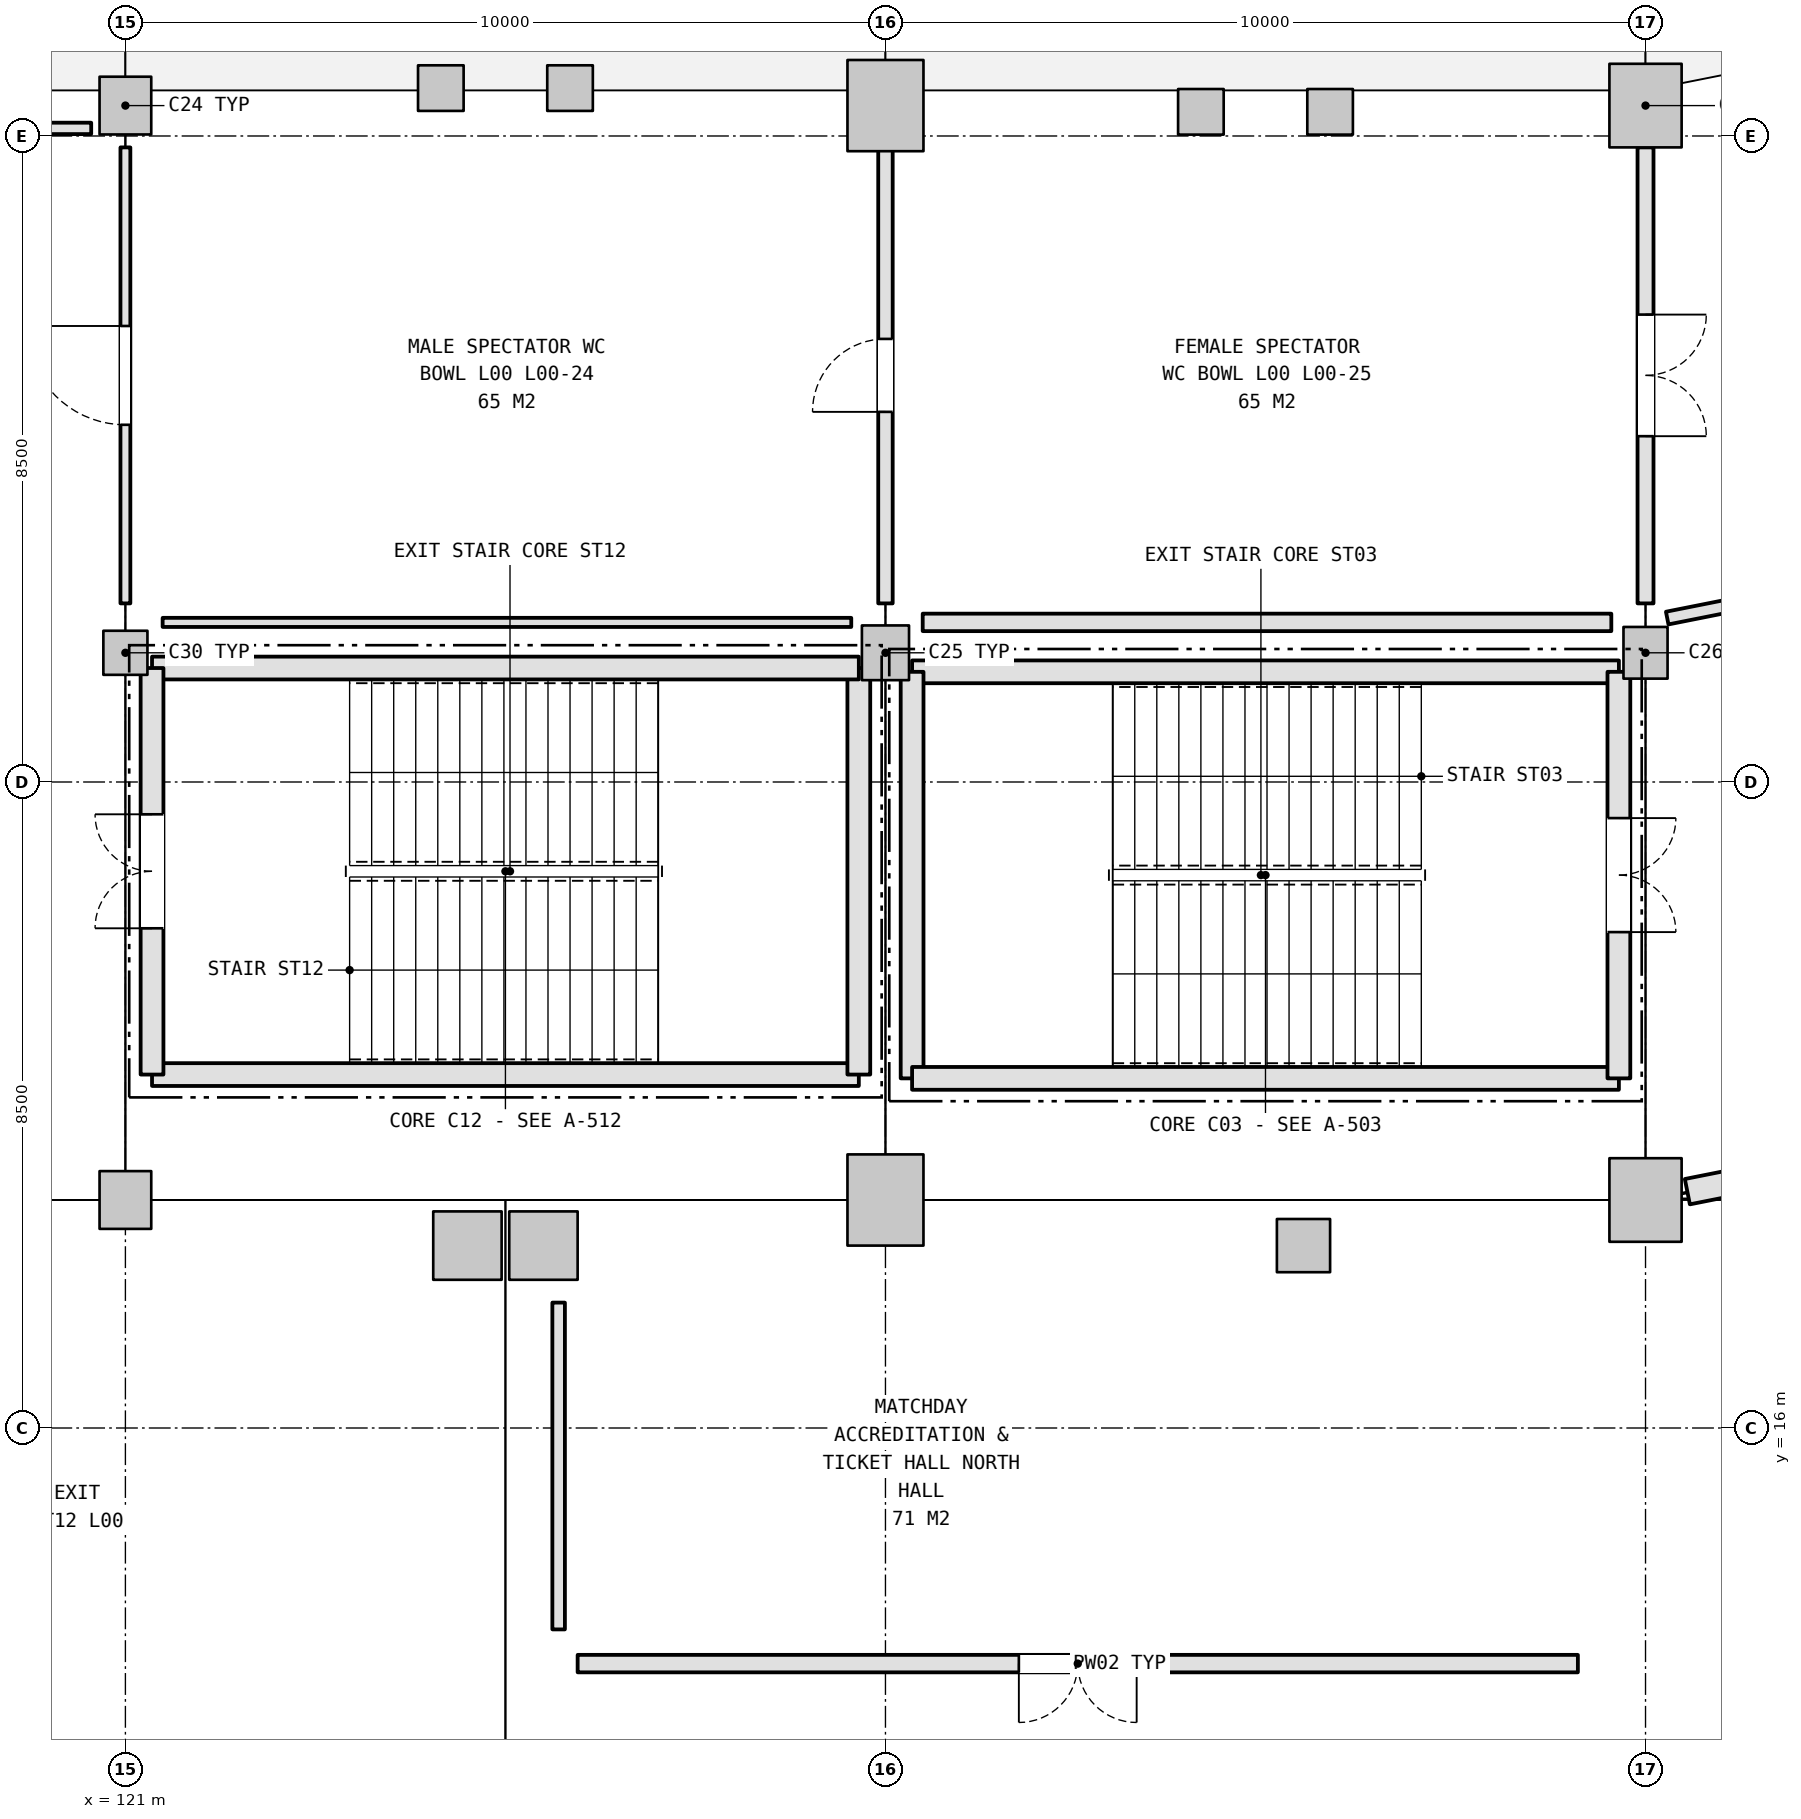
"""IFC4 building model, lengths in metres.
Left out: names, types, materials, properties, quantities, classifications, styles, units other than length and angle.
Written with IfcOpenShell. Run it as: python <this file> out.ifc"""

import sys

from ifc_helpers import new_model, si_unit, direction, frame, frame_2d, origin, origin_2d, place, context, subcontext, project, spatial, rectangle, extrude, element, fill, save


model = new_model("IFC4")
c1 = context("Model", 3, precision=1e-05, world=origin(), true_north=direction((0.0, 1.0)))
c2 = subcontext(c1, "Body", "Model", "MODEL_VIEW")
j1 = project(units=[si_unit("LENGTHUNIT", "METRE"), si_unit("PLANEANGLEUNIT", "RADIAN")], contexts=[c1])
p1 = place(None, origin())
s1 = spatial("IfcSite", under=j1, at=p1, CompositionType="ELEMENT")
p2 = place(p1, origin())
s2 = spatial("IfcBuilding", under=s1, at=p2, CompositionType="ELEMENT")
p3 = place(p2, origin())
s3 = spatial("IfcBuildingStorey", under=s2, at=p3, CompositionType="ELEMENT", Elevation=0.0)
p4 = place(p3, frame((121.0, 33.4, 0.0), z_axis=(0.0, 0.0, 1.0), x_axis=(1.0, 0.0, 0.0)))
e1 = element("IfcColumn", 1, at=p4, inside=s3, PredefinedType="COLUMN", context=c2, shape_type="SweptSolid", body=[
    extrude(rectangle(XDim=0.68, YDim=0.76, at=origin_2d()), origin(), (0.0, 0.0, 1.0), 5.4),
])
p5 = place(p3, frame((121.0, 26.2, 0.0), z_axis=(0.0, 0.0, 1.0), x_axis=(1.0, 0.0, 0.0)))
e2 = element("IfcColumn", 2, at=p5, inside=s3, PredefinedType="COLUMN", context=c2, shape_type="SweptSolid", body=[
    extrude(rectangle(XDim=0.58, YDim=0.58, at=origin_2d()), origin(), (0.0, 0.0, 1.0), 5.4),
])
p6 = place(p3, frame((121.0, 19.0, 0.0), z_axis=(0.0, 0.0, 1.0), x_axis=(1.0, 0.0, 0.0)))
e3 = element("IfcColumn", 3, at=p6, inside=s3, PredefinedType="COLUMN", context=c2, shape_type="SweptSolid", body=[
    extrude(rectangle(XDim=0.68, YDim=0.76, at=origin_2d()), origin(), (0.0, 0.0, 1.0), 5.4),
])
p7 = place(p3, frame((131.0, 33.4, 0.0), z_axis=(0.0, 0.0, 1.0), x_axis=(1.0, 0.0, 0.0)))
e4 = element("IfcColumn", 4, at=p7, inside=s3, PredefinedType="COLUMN", context=c2, shape_type="SweptSolid", body=[
    extrude(rectangle(XDim=1.0, YDim=1.2, at=origin_2d()), origin(), (0.0, 0.0, 1.0), 5.4),
])
p8 = place(p3, frame((131.0, 26.2, 0.0), z_axis=(0.0, 0.0, 1.0), x_axis=(1.0, 0.0, 0.0)))
e5 = element("IfcColumn", 5, at=p8, inside=s3, PredefinedType="COLUMN", context=c2, shape_type="SweptSolid", body=[
    extrude(rectangle(XDim=0.62, YDim=0.72, at=origin_2d()), origin(), (0.0, 0.0, 1.0), 5.4),
])
p9 = place(p3, frame((131.0, 19.0, 0.0), z_axis=(0.0, 0.0, 1.0), x_axis=(1.0, 0.0, 0.0)))
e6 = element("IfcColumn", 6, at=p9, inside=s3, PredefinedType="COLUMN", context=c2, shape_type="SweptSolid", body=[
    extrude(rectangle(XDim=1.0, YDim=1.2, at=origin_2d()), origin(), (0.0, 0.0, 1.0), 5.4),
])
p10 = place(p3, frame((141.0, 33.4, 0.0), z_axis=(0.0, 0.0, 1.0), x_axis=(1.0, 0.0, 0.0)))
e7 = element("IfcColumn", 7, at=p10, inside=s3, PredefinedType="COLUMN", context=c2, shape_type="SweptSolid", body=[
    extrude(rectangle(XDim=0.95, YDim=1.1, at=origin_2d()), origin(), (0.0, 0.0, 1.0), 5.4),
])
p11 = place(p3, frame((141.0, 26.2, 0.0), z_axis=(0.0, 0.0, 1.0), x_axis=(1.0, 0.0, 0.0)))
e8 = element("IfcColumn", 8, at=p11, inside=s3, PredefinedType="COLUMN", context=c2, shape_type="SweptSolid", body=[
    extrude(rectangle(XDim=0.58, YDim=0.68, at=origin_2d()), origin(), (0.0, 0.0, 1.0), 5.4),
])
p12 = place(p3, frame((141.0, 19.0, 0.0), z_axis=(0.0, 0.0, 1.0), x_axis=(1.0, 0.0, 0.0)))
e9 = element("IfcColumn", 9, at=p12, inside=s3, PredefinedType="COLUMN", context=c2, shape_type="SweptSolid", body=[
    extrude(rectangle(XDim=0.95, YDim=1.1, at=origin_2d()), origin(), (0.0, 0.0, 1.0), 5.4),
])
p13 = place(p3, frame((126.5, 18.4, 0.0), z_axis=(0.0, 0.0, 1.0), x_axis=(1.0, 0.0, 0.0)))
e10 = element("IfcColumn", 10, at=p13, inside=s3, PredefinedType="COLUMN", context=c2, shape_type="SweptSolid", body=[
    extrude(rectangle(XDim=0.9, YDim=0.9, at=origin_2d()), origin(), (0.0, 0.0, 1.0), 5.4),
])
p14 = place(p3, frame((136.5, 18.4, 0.0), z_axis=(0.0, 0.0, 1.0), x_axis=(1.0, 0.0, 0.0)))
e11 = element("IfcColumn", 11, at=p14, inside=s3, PredefinedType="COLUMN", context=c2, shape_type="SweptSolid", body=[
    extrude(rectangle(XDim=0.7, YDim=0.7, at=origin_2d()), origin(), (0.0, 0.0, 1.0), 5.4),
])
p15 = place(p3, frame((125.5, 18.4, 0.0), z_axis=(0.0, 0.0, 1.0), x_axis=(1.0, 0.0, 0.0)))
e12 = element("IfcColumn", 12, at=p15, inside=s3, PredefinedType="COLUMN", context=c2, shape_type="SweptSolid", body=[
    extrude(rectangle(XDim=0.9, YDim=0.9, at=origin_2d()), origin(), (0.0, 0.0, 1.0), 5.4),
])
p16 = place(p3, frame((141.55, 19.11, 0.0), z_axis=(0.0, 0.0, 1.0), x_axis=(0.980787488403, 0.195079221324, 0.0)))
e13 = element("IfcWall", 13, at=p16, inside=s3, PredefinedType="SOLIDWALL", context=c2, shape_type="SweptSolid", body=[
    extrude(rectangle(XDim=19.246, YDim=0.34, at=frame_2d((9.623, 0.0))), origin(), (0.0, 0.0, 1.0), 4.275),
])
p17 = place(p16, frame((8.823, 0.0, 2.4)))
e14 = element("IfcOpeningElement", 14, at=p17, cuts=e13, PredefinedType="OPENING", context=c2, shape_type="SweptSolid", body=[
    extrude(rectangle(XDim=1.6, YDim=1.2, at=frame_2d((0.8, 0.6))), frame((0.0, 0.18, 0.0), z_axis=(0.0, -1.0, 0.0), x_axis=(1.0, 0.0, 0.0)), (0.0, 0.0, 1.0), 0.36),
])
p18 = place(p3, frame((140.65, 25.95, 0.0), z_axis=(0.0, 0.0, 1.0), x_axis=(-1.0, 0.0, 0.0)))
e15 = element("IfcWall", 15, at=p18, inside=s3, PredefinedType="SHEAR", context=c2, shape_type="SweptSolid", body=[
    extrude(rectangle(XDim=9.299, YDim=0.3, at=frame_2d((4.65, 0.0))), origin(), (0.0, 0.0, 1.0), 5.14),
])
p19 = place(p3, frame((131.35, 25.95, 0.0), z_axis=(0.0, 0.0, 1.0), x_axis=(0.0, -1.0, 0.0)))
e16 = element("IfcWall", 16, at=p19, inside=s3, PredefinedType="SHEAR", context=c2, shape_type="SweptSolid", body=[
    extrude(rectangle(XDim=5.349, YDim=0.3, at=frame_2d((2.675, 0.0))), origin(), (0.0, 0.0, 1.0), 5.14),
])
p20 = place(p3, frame((131.35, 20.6, 0.0), z_axis=(0.0, 0.0, 1.0), x_axis=(1.0, 0.0, 0.0)))
e17 = element("IfcWall", 17, at=p20, inside=s3, PredefinedType="SHEAR", context=c2, shape_type="SweptSolid", body=[
    extrude(rectangle(XDim=9.299, YDim=0.3, at=frame_2d((4.65, 0.0))), origin(), (0.0, 0.0, 1.0), 5.14),
])
p21 = place(p3, frame((140.65, 20.6, 0.0), z_axis=(0.0, 0.0, 1.0), x_axis=(0.0, 1.0, 0.0)))
e18 = element("IfcWall", 18, at=p21, inside=s3, PredefinedType="SHEAR", context=c2, shape_type="SweptSolid", body=[
    extrude(rectangle(XDim=5.349, YDim=0.3, at=frame_2d((2.675, 0.0))), origin(), (0.0, 0.0, 1.0), 5.14),
])
p22 = place(p21, frame((1.925, 0.0, 0.0)))
e19 = element("IfcOpeningElement", 19, at=p22, cuts=e18, PredefinedType="OPENING", context=c2, shape_type="SweptSolid", body=[
    extrude(rectangle(XDim=1.5, YDim=2.2, at=frame_2d((0.75, 1.1))), frame((0.0, 0.16, 0.0), z_axis=(0.0, -1.0, 0.0), x_axis=(1.0, 0.0, 0.0)), (0.0, 0.0, 1.0), 0.32),
])
p23 = place(p3, frame((121.35, 20.65, 0.0), z_axis=(0.0, 0.0, 1.0), x_axis=(1.0, 0.0, 0.0)))
e20 = element("IfcWall", 20, at=p23, inside=s3, PredefinedType="SHEAR", context=c2, shape_type="SweptSolid", body=[
    extrude(rectangle(XDim=9.299, YDim=0.3, at=frame_2d((4.65, 0.0))), origin(), (0.0, 0.0, 1.0), 5.14),
])
p24 = place(p3, frame((130.65, 20.65, 0.0), z_axis=(0.0, 0.0, 1.0), x_axis=(0.0, 1.0, 0.0)))
e21 = element("IfcWall", 21, at=p24, inside=s3, PredefinedType="SHEAR", context=c2, shape_type="SweptSolid", body=[
    extrude(rectangle(XDim=5.349, YDim=0.3, at=frame_2d((2.675, 0.0))), origin(), (0.0, 0.0, 1.0), 5.14),
])
p25 = place(p3, frame((130.65, 26.0, 0.0), z_axis=(0.0, 0.0, 1.0), x_axis=(-1.0, 0.0, 0.0)))
e22 = element("IfcWall", 22, at=p25, inside=s3, PredefinedType="SHEAR", context=c2, shape_type="SweptSolid", body=[
    extrude(rectangle(XDim=9.299, YDim=0.3, at=frame_2d((4.65, 0.0))), origin(), (0.0, 0.0, 1.0), 5.14),
])
p26 = place(p3, frame((121.35, 26.0, 0.0), z_axis=(0.0, 0.0, 1.0), x_axis=(0.0, -1.0, 0.0)))
e23 = element("IfcWall", 23, at=p26, inside=s3, PredefinedType="SHEAR", context=c2, shape_type="SweptSolid", body=[
    extrude(rectangle(XDim=5.349, YDim=0.3, at=frame_2d((2.675, 0.0))), origin(), (0.0, 0.0, 1.0), 5.14),
])
p27 = place(p26, frame((1.925, 0.0, 0.0)))
e24 = element("IfcOpeningElement", 24, at=p27, cuts=e23, PredefinedType="OPENING", context=c2, shape_type="SweptSolid", body=[
    extrude(rectangle(XDim=1.5, YDim=2.2, at=frame_2d((0.75, 1.1))), frame((0.0, 0.16, 0.0), z_axis=(0.0, -1.0, 0.0), x_axis=(1.0, 0.0, 0.0)), (0.0, 0.0, 1.0), 0.32),
])
for number, where, z_axis, x_axis in (
    (25, (126.85, 33.63, 0.0), (0.0, 0.0, 1.0), (1.0, 0.0, 0.0)),
    (26, (125.15, 33.63, 0.0), (0.0, 0.0, 1.0), (1.0, 0.0, 0.0)),
    (27, (136.85, 33.318, 0.0), (0.0, 0.0, 1.0), (1.0, 0.0, 0.0)),
    (28, (135.15, 33.318, 0.0), (0.0, 0.0, 1.0), (1.0, 0.0, 0.0)),
):
    element("IfcColumn", number, at=place(p3, frame(where, z_axis=z_axis, x_axis=x_axis)), inside=s3, PredefinedType="COLUMN", context=c2, shape_type="SweptSolid", body=[
        extrude(rectangle(XDim=0.6, YDim=0.6, at=origin_2d()), origin(), (0.0, 0.0, 1.0), 5.4),
    ])
p28 = place(p3, frame((140.11, 12.9, 0.0), z_axis=(0.0, 0.0, 1.0), x_axis=(-1.0, 0.0, 0.0)))
e29 = element("IfcWall", 29, at=p28, inside=s3, PredefinedType="PLUMBINGWALL", context=c2, shape_type="SweptSolid", body=[
    extrude(rectangle(XDim=13.16, YDim=0.23, at=frame_2d((6.58, 0.0))), origin(), (0.0, 0.0, 1.0), 4.425),
])
p29 = place(p28, frame((5.805, 0.0, 0.0)))
e30 = element("IfcOpeningElement", 30, at=p29, cuts=e29, PredefinedType="OPENING", context=c2, shape_type="SweptSolid", body=[
    extrude(rectangle(XDim=1.55, YDim=2.15, at=frame_2d((0.775, 1.075))), frame((0.0, 0.125, 0.0), z_axis=(0.0, -1.0, 0.0), x_axis=(1.0, 0.0, 0.0)), (0.0, 0.0, 1.0), 0.25),
])
p30 = place(p3, frame((126.7, 13.35, 0.0), z_axis=(0.0, 0.0, 1.0), x_axis=(0.0, 1.0, 0.0)))
e31 = element("IfcWall", 31, at=p30, inside=s3, PredefinedType="PARTITIONING", context=c2, shape_type="SweptSolid", body=[
    extrude(rectangle(XDim=4.3, YDim=0.165, at=frame_2d((2.15, 0.0))), origin(), (0.0, 0.0, 1.0), 4.475),
])
p31 = place(p3, frame((121.0, 32.85, 0.0), z_axis=(0.0, 0.0, 1.0), x_axis=(0.0, -1.0, 0.0)))
e32 = element("IfcWall", 32, at=p31, inside=s3, PredefinedType="PARTITIONING", context=c2, shape_type="SweptSolid", body=[
    extrude(rectangle(XDim=6.0, YDim=0.13, at=frame_2d((3.0, 0.0))), origin(), (0.0, 0.0, 1.0), 4.365),
])
p32 = place(p31, frame((2.35, 0.0, 0.0)))
e33 = element("IfcOpeningElement", 33, at=p32, cuts=e32, PredefinedType="OPENING", context=c2, shape_type="SweptSolid", body=[
    extrude(rectangle(XDim=1.3, YDim=2.2, at=frame_2d((0.65, 1.1))), frame((0.0, 0.075, 0.0), z_axis=(0.0, -1.0, 0.0), x_axis=(1.0, 0.0, 0.0)), (0.0, 0.0, 1.0), 0.15),
])
p33 = place(p3, frame((111.49, 33.1, 0.0), z_axis=(0.0, 0.0, 1.0), x_axis=(1.0, 0.0, 0.0)))
e34 = element("IfcWall", 34, at=p33, inside=s3, PredefinedType="PARTITIONING", context=c2, shape_type="SweptSolid", body=[
    extrude(rectangle(XDim=9.06, YDim=0.15, at=frame_2d((4.53, 0.0))), origin(), (0.0, 0.0, 1.0), 4.325),
])
p34 = place(p3, frame((131.0, 32.85, 0.0), z_axis=(0.0, 0.0, 1.0), x_axis=(0.0, -1.0, 0.0)))
e35 = element("IfcWall", 35, at=p34, inside=s3, PredefinedType="PARTITIONING", context=c2, shape_type="SweptSolid", body=[
    extrude(rectangle(XDim=6.0, YDim=0.19, at=frame_2d((3.0, 0.0))), origin(), (0.0, 0.0, 1.0), 4.385),
])
p35 = place(p34, frame((2.52, 0.0, 0.0)))
e36 = element("IfcOpeningElement", 36, at=p35, cuts=e35, PredefinedType="OPENING", context=c2, shape_type="SweptSolid", body=[
    extrude(rectangle(XDim=0.96, YDim=2.15, at=frame_2d((0.48, 1.075))), frame((0.0, 0.105, 0.0), z_axis=(0.0, -1.0, 0.0), x_axis=(1.0, 0.0, 0.0)), (0.0, 0.0, 1.0), 0.21),
])
p36 = place(p3, frame((130.55, 26.6, 0.0), z_axis=(0.0, 0.0, 1.0), x_axis=(-1.0, 0.0, 0.0)))
e37 = element("IfcWall", 37, at=p36, inside=s3, PredefinedType="PARTITIONING", context=c2, shape_type="SweptSolid", body=[
    extrude(rectangle(XDim=9.06, YDim=0.12, at=frame_2d((4.53, 0.0))), origin(), (0.0, 0.0, 1.0), 5.12),
])
p37 = place(p3, frame((141.0, 32.85, 0.0), z_axis=(0.0, 0.0, 1.0), x_axis=(0.0, -1.0, 0.0)))
e38 = element("IfcWall", 38, at=p37, inside=s3, PredefinedType="PLUMBINGWALL", context=c2, shape_type="SweptSolid", body=[
    extrude(rectangle(XDim=6.0, YDim=0.21, at=frame_2d((3.0, 0.0))), origin(), (0.0, 0.0, 1.0), 4.305),
])
p38 = place(p37, frame((2.2, 0.0, 0.0)))
e39 = element("IfcOpeningElement", 39, at=p38, cuts=e38, PredefinedType="OPENING", context=c2, shape_type="SweptSolid", body=[
    extrude(rectangle(XDim=1.6, YDim=2.2, at=frame_2d((0.8, 1.1))), frame((0.0, 0.115, 0.0), z_axis=(0.0, -1.0, 0.0), x_axis=(1.0, 0.0, 0.0)), (0.0, 0.0, 1.0), 0.23),
])
p39 = place(p3, frame((140.55, 26.6, 0.0), z_axis=(0.0, 0.0, 1.0), x_axis=(-1.0, 0.0, 0.0)))
e40 = element("IfcWall", 40, at=p39, inside=s3, PredefinedType="PLUMBINGWALL", context=c2, shape_type="SweptSolid", body=[
    extrude(rectangle(XDim=9.06, YDim=0.23, at=frame_2d((4.53, 0.0))), origin(), (0.0, 0.0, 1.0), 5.12),
])
p40 = place(p3, frame((157.746, 29.931, 0.0), z_axis=(0.0, 0.0, 1.0), x_axis=(-0.980786027867, -0.195086564225, 0.0)))
e41 = element("IfcWall", 41, at=p40, inside=s3, PredefinedType="PARTITIONING", context=c2, shape_type="SweptSolid", body=[
    extrude(rectangle(XDim=16.783, YDim=0.17, at=frame_2d((8.392, 0.0))), origin(), (0.0, 0.0, 1.0), 4.305),
])
p41 = place(p40, frame((7.942, 0.0, 0.0)))
e42 = element("IfcOpeningElement", 42, at=p41, cuts=e41, PredefinedType="OPENING", context=c2, shape_type="SweptSolid", body=[
    extrude(rectangle(XDim=0.9, YDim=2.1, at=frame_2d((0.45, 1.05))), frame((0.0, 0.095, 0.0), z_axis=(0.0, -1.0, 0.0), x_axis=(1.0, 0.0, 0.0)), (0.0, 0.0, 1.0), 0.19),
])
p42 = place(p22, frame((1.5, 0.0, 0.0), z_axis=(0.0, 0.0, 1.0), x_axis=(-1.0, 0.0, 0.0)))
e43 = element("IfcDoor", 43, at=p42, inside=s3, OperationType="DOUBLE_DOOR_SINGLE_SWING", PredefinedType="DOOR", context=c2, shape_type="SweptSolid", body=[
    extrude(rectangle(XDim=1.5, YDim=2.2, at=frame_2d((0.75, 1.1))), frame((0.0, 0.025, 0.0), z_axis=(0.0, -1.0, 0.0), x_axis=(1.0, 0.0, 0.0)), (0.0, 0.0, 1.0), 0.05),
])
fill(e19, e43)
p43 = place(p27, frame((1.5, 0.0, 0.0), z_axis=(0.0, 0.0, 1.0), x_axis=(-1.0, 0.0, 0.0)))
e44 = element("IfcDoor", 44, at=p43, inside=s3, OperationType="DOUBLE_DOOR_SINGLE_SWING", PredefinedType="DOOR", context=c2, shape_type="SweptSolid", body=[
    extrude(rectangle(XDim=1.5, YDim=2.2, at=frame_2d((0.75, 1.1))), frame((0.0, 0.025, 0.0), z_axis=(0.0, -1.0, 0.0), x_axis=(1.0, 0.0, 0.0)), (0.0, 0.0, 1.0), 0.05),
])
fill(e24, e44)
p44 = place(p29, origin())
e45 = element("IfcDoor", 45, at=p44, inside=s3, OperationType="DOUBLE_DOOR_SINGLE_SWING", PredefinedType="DOOR", context=c2, shape_type="SweptSolid", body=[
    extrude(rectangle(XDim=1.55, YDim=2.15, at=frame_2d((0.775, 1.075))), frame((0.0, 0.025, 0.0), z_axis=(0.0, -1.0, 0.0), x_axis=(1.0, 0.0, 0.0)), (0.0, 0.0, 1.0), 0.05),
])
fill(e30, e45)
p45 = place(p32, frame((1.3, 0.0, 0.0), z_axis=(0.0, 0.0, 1.0), x_axis=(-1.0, 0.0, 0.0)))
e46 = element("IfcDoor", 46, at=p45, inside=s3, OperationType="SINGLE_SWING_LEFT", PredefinedType="DOOR", context=c2, shape_type="SweptSolid", body=[
    extrude(rectangle(XDim=1.3, YDim=2.2, at=frame_2d((0.65, 1.1))), frame((0.0, 0.025, 0.0), z_axis=(0.0, -1.0, 0.0), x_axis=(1.0, 0.0, 0.0)), (0.0, 0.0, 1.0), 0.05),
])
fill(e33, e46)
p46 = place(p35, frame((0.96, 0.0, 0.0), z_axis=(0.0, 0.0, 1.0), x_axis=(-1.0, 0.0, 0.0)))
e47 = element("IfcDoor", 47, at=p46, inside=s3, OperationType="SINGLE_SWING_RIGHT", PredefinedType="DOOR", context=c2, shape_type="SweptSolid", body=[
    extrude(rectangle(XDim=0.96, YDim=2.15, at=frame_2d((0.48, 1.075))), frame((0.0, 0.025, 0.0), z_axis=(0.0, -1.0, 0.0), x_axis=(1.0, 0.0, 0.0)), (0.0, 0.0, 1.0), 0.05),
])
fill(e36, e47)
p47 = place(p38, origin())
e48 = element("IfcDoor", 48, at=p47, inside=s3, OperationType="DOUBLE_DOOR_SINGLE_SWING", PredefinedType="DOOR", context=c2, shape_type="SweptSolid", body=[
    extrude(rectangle(XDim=1.6, YDim=2.2, at=frame_2d((0.8, 1.1))), frame((0.0, 0.025, 0.0), z_axis=(0.0, -1.0, 0.0), x_axis=(1.0, 0.0, 0.0)), (0.0, 0.0, 1.0), 0.05),
])
fill(e39, e48)
save(model, sys.argv[1])
